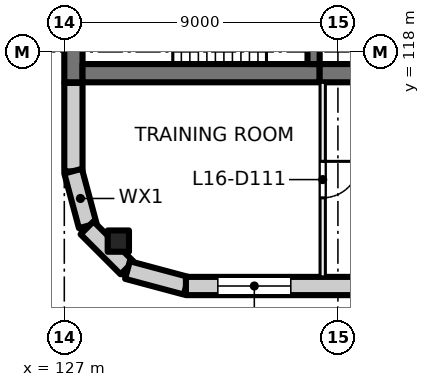
"""IFC4 building model, lengths in metres.
Left out: names, types, materials, properties, quantities, classifications, styles, units other than length and angle.
Written with IfcOpenShell. Run it as: python <this file> out.ifc"""

import sys

from ifc_helpers import new_model, si_unit, direction, frame, frame_2d, origin, origin_2d, place, context, subcontext, project, spatial, rectangle, extrude, element, fill, save


model = new_model("IFC4")
c1 = context("Model", 3, precision=1e-05, world=origin(), true_north=direction((0.0, 1.0)))
c2 = subcontext(c1, "Body", "Model", "MODEL_VIEW")
j1 = project(units=[si_unit("LENGTHUNIT", "METRE"), si_unit("PLANEANGLEUNIT", "RADIAN")], contexts=[c1])
p1 = place(None, origin())
s1 = spatial("IfcSite", under=j1, at=p1, CompositionType="ELEMENT")
p2 = place(p1, origin())
s2 = spatial("IfcBuilding", under=s1, at=p2, CompositionType="ELEMENT")
p3 = place(p2, frame((0.0, 0.0, 71.5)))
s3 = spatial("IfcBuildingStorey", under=s2, at=p3, CompositionType="ELEMENT", Elevation=71.5)
p4 = place(p3, frame((128.777, 111.777, 0.0), z_axis=(0.0, 0.0, 1.0), x_axis=(1.0, 0.0, 0.0)))
e1 = element("IfcColumn", 1, at=p4, inside=s3, PredefinedType="COLUMN", context=c2, shape_type="SweptSolid", body=[
    extrude(rectangle(XDim=0.7, YDim=0.7, at=origin_2d()), origin(), (0.0, 0.0, 1.0), 4.0),
])
p5 = place(p3, frame((127.3, 117.0, 0.0), z_axis=(0.0, 0.0, 1.0), x_axis=(0.0, 1.0, 0.0)))
e2 = element("IfcWall", 2, at=p5, inside=s3, PredefinedType="SHEAR", context=c2, shape_type="SweptSolid", body=[
    extrude(rectangle(XDim=3.8, YDim=0.6, at=frame_2d((1.9, 0.0))), origin(), (0.0, 0.0, 1.0), 4.0),
])
p6 = place(p3, frame((127.6, 117.3, 0.0), z_axis=(0.0, 0.0, 1.0), x_axis=(1.0, 0.0, 0.0)))
e3 = element("IfcWall", 3, at=p6, inside=s3, PredefinedType="SHEAR", context=c2, shape_type="SweptSolid", body=[
    extrude(rectangle(XDim=7.8, YDim=0.6, at=frame_2d((3.9, 0.0))), origin(), (0.0, 0.0, 1.0), 4.0),
])
p7 = place(p3, frame((135.4, 117.3, 0.0), z_axis=(0.0, 0.0, 1.0), x_axis=(1.0, 0.0, 0.0)))
e4 = element("IfcWall", 4, at=p7, inside=s3, PredefinedType="SHEAR", context=c2, shape_type="SweptSolid", body=[
    extrude(rectangle(XDim=4.6, YDim=0.6, at=frame_2d((2.3, 0.0))), origin(), (0.0, 0.0, 1.0), 4.0),
])
p8 = place(p3, frame((135.2, 117.6, 0.0), z_axis=(0.0, 0.0, 1.0), x_axis=(0.0, 1.0, 0.0)))
e5 = element("IfcWall", 5, at=p8, inside=s3, PredefinedType="SHEAR", context=c2, shape_type="SweptSolid", body=[
    extrude(rectangle(XDim=2.8, YDim=0.4, at=frame_2d((1.4, 0.0))), origin(), (0.0, 0.0, 1.0), 4.0),
])
p9 = place(p8, frame((0.9, 0.0, 0.0)))
e6 = element("IfcOpeningElement", 6, at=p9, cuts=e5, PredefinedType="OPENING", context=c2, shape_type="SweptSolid", body=[
    extrude(rectangle(XDim=1.0, YDim=2.1, at=frame_2d((0.5, 1.05))), frame((0.0, 0.21, 0.0), z_axis=(0.0, -1.0, 0.0), x_axis=(1.0, 0.0, 0.0)), (0.0, 0.0, 1.0), 0.42),
])
p10 = place(p3, frame((127.3, 114.07, 0.0), z_axis=(0.0, 0.0, 1.0), x_axis=(0.0, 1.0, 0.0)))
e7 = element("IfcWall", 7, at=p10, inside=s3, PredefinedType="SOLIDWALL", context=c2, shape_type="SweptSolid", body=[
    extrude(rectangle(XDim=2.91, YDim=0.6, at=frame_2d((1.455, 0.0))), origin(), (0.0, 0.0, 1.0), 3.625),
])
for number, where, z_axis, x_axis in (
    (8, (127.771, 112.281, 0.0), (0.0, 0.0, 1.0), (-0.259, 0.966, 0.0)),
    (9, (129.064, 110.896, 0.0), (0.0, 0.0, 1.0), (-0.707, 0.707, 0.0)),
):
    element("IfcWall", number, at=place(p3, frame(where, z_axis=z_axis, x_axis=x_axis)), inside=s3, PredefinedType="SOLIDWALL", context=c2, shape_type="SweptSolid", body=[
        extrude(rectangle(XDim=1.861, YDim=0.6, at=frame_2d((0.93, 0.0))), origin(), (0.0, 0.0, 1.0), 3.625),
    ])
p11 = place(p3, frame((131.01, 110.308, 0.0), z_axis=(0.0, 0.0, 1.0), x_axis=(-0.965920269068, 0.258839784042, 0.0)))
e10 = element("IfcWall", 10, at=p11, inside=s3, PredefinedType="SOLIDWALL", context=c2, shape_type="SweptSolid", body=[
    extrude(rectangle(XDim=2.0, YDim=0.6, at=frame_2d((1.0, 0.0))), origin(), (0.0, 0.0, 1.0), 3.625),
])
p12 = place(p3, frame((162.93, 110.3, 0.0), z_axis=(0.0, 0.0, 1.0), x_axis=(-1.0, 0.0, 0.0)))
e11 = element("IfcWall", 11, at=p12, inside=s3, PredefinedType="SOLIDWALL", context=c2, shape_type="SweptSolid", body=[
    extrude(rectangle(XDim=31.93, YDim=0.6, at=frame_2d((15.965, 0.0))), origin(), (0.0, 0.0, 1.0), 3.625),
])
p13 = place(p12, frame((1.48, 0.0, 0.9)))
e12 = element("IfcOpeningElement", 12, at=p13, cuts=e11, PredefinedType="OPENING", context=c2, shape_type="SweptSolid", body=[
    extrude(rectangle(XDim=2.4, YDim=2.4, at=frame_2d((1.2, 1.2))), frame((0.0, 0.31, 0.0), z_axis=(0.0, -1.0, 0.0), x_axis=(1.0, 0.0, 0.0)), (0.0, 0.0, 1.0), 0.62),
])
p14 = place(p12, frame((5.98, 0.0, 0.9)))
e13 = element("IfcOpeningElement", 13, at=p14, cuts=e11, PredefinedType="OPENING", context=c2, shape_type="SweptSolid", body=[
    extrude(rectangle(XDim=2.4, YDim=2.4, at=frame_2d((1.2, 1.2))), frame((0.0, 0.31, 0.0), z_axis=(0.0, -1.0, 0.0), x_axis=(1.0, 0.0, 0.0)), (0.0, 0.0, 1.0), 0.62),
])
p15 = place(p12, frame((10.48, 0.0, 0.9)))
e14 = element("IfcOpeningElement", 14, at=p15, cuts=e11, PredefinedType="OPENING", context=c2, shape_type="SweptSolid", body=[
    extrude(rectangle(XDim=2.4, YDim=2.4, at=frame_2d((1.2, 1.2))), frame((0.0, 0.31, 0.0), z_axis=(0.0, -1.0, 0.0), x_axis=(1.0, 0.0, 0.0)), (0.0, 0.0, 1.0), 0.62),
])
p16 = place(p12, frame((14.98, 0.0, 0.9)))
e15 = element("IfcOpeningElement", 15, at=p16, cuts=e11, PredefinedType="OPENING", context=c2, shape_type="SweptSolid", body=[
    extrude(rectangle(XDim=2.4, YDim=2.4, at=frame_2d((1.2, 1.2))), frame((0.0, 0.31, 0.0), z_axis=(0.0, -1.0, 0.0), x_axis=(1.0, 0.0, 0.0)), (0.0, 0.0, 1.0), 0.62),
])
p17 = place(p12, frame((19.48, 0.0, 0.9)))
e16 = element("IfcOpeningElement", 16, at=p17, cuts=e11, PredefinedType="OPENING", context=c2, shape_type="SweptSolid", body=[
    extrude(rectangle(XDim=2.4, YDim=2.4, at=frame_2d((1.2, 1.2))), frame((0.0, 0.31, 0.0), z_axis=(0.0, -1.0, 0.0), x_axis=(1.0, 0.0, 0.0)), (0.0, 0.0, 1.0), 0.62),
])
p18 = place(p12, frame((23.98, 0.0, 0.9)))
e17 = element("IfcOpeningElement", 17, at=p18, cuts=e11, PredefinedType="OPENING", context=c2, shape_type="SweptSolid", body=[
    extrude(rectangle(XDim=2.4, YDim=2.4, at=frame_2d((1.2, 1.2))), frame((0.0, 0.31, 0.0), z_axis=(0.0, -1.0, 0.0), x_axis=(1.0, 0.0, 0.0)), (0.0, 0.0, 1.0), 0.62),
])
p19 = place(p12, frame((28.48, 0.0, 0.9)))
e18 = element("IfcOpeningElement", 18, at=p19, cuts=e11, PredefinedType="OPENING", context=c2, shape_type="SweptSolid", body=[
    extrude(rectangle(XDim=2.4, YDim=2.4, at=frame_2d((1.2, 1.2))), frame((0.0, 0.31, 0.0), z_axis=(0.0, -1.0, 0.0), x_axis=(1.0, 0.0, 0.0)), (0.0, 0.0, 1.0), 0.62),
])
p20 = place(p3, frame((135.5, 117.0, 0.0), z_axis=(0.0, 0.0, 1.0), x_axis=(0.0, -1.0, 0.0)))
e19 = element("IfcWall", 19, at=p20, inside=s3, PredefinedType="PARTITIONING", context=c2, shape_type="SweptSolid", body=[
    extrude(rectangle(XDim=6.4, YDim=0.175, at=frame_2d((3.2, 0.0))), origin(), (0.0, 0.0, 1.0), 3.625),
])
p21 = place(p20, frame((2.6, 0.0, 0.0)))
e20 = element("IfcOpeningElement", 20, at=p21, cuts=e19, PredefinedType="OPENING", context=c2, shape_type="SweptSolid", body=[
    extrude(rectangle(XDim=1.2, YDim=2.1, at=frame_2d((0.6, 1.05))), frame((0.0, 0.097, 0.0), z_axis=(0.0, -1.0, 0.0), x_axis=(1.0, 0.0, 0.0)), (0.0, 0.0, 1.0), 0.195),
])
p22 = place(p19, origin())
e21 = element("IfcWindow", 21, at=p22, inside=s3, PartitioningType="SINGLE_PANEL", PredefinedType="WINDOW", context=c2, shape_type="SweptSolid", body=[
    extrude(rectangle(XDim=2.4, YDim=2.4, at=frame_2d((1.2, 1.2))), frame((0.0, 0.03, 0.0), z_axis=(0.0, -1.0, 0.0), x_axis=(1.0, 0.0, 0.0)), (0.0, 0.0, 1.0), 0.06),
])
fill(e18, e21)
p23 = place(p21, origin())
e22 = element("IfcDoor", 22, at=p23, inside=s3, OperationType="DOUBLE_DOOR_SINGLE_SWING", PredefinedType="DOOR", context=c2, shape_type="SweptSolid", body=[
    extrude(rectangle(XDim=1.2, YDim=2.1, at=frame_2d((0.6, 1.05))), frame((0.0, 0.025, 0.0), z_axis=(0.0, -1.0, 0.0), x_axis=(1.0, 0.0, 0.0)), (0.0, 0.0, 1.0), 0.05),
])
fill(e20, e22)
save(model, sys.argv[1])
